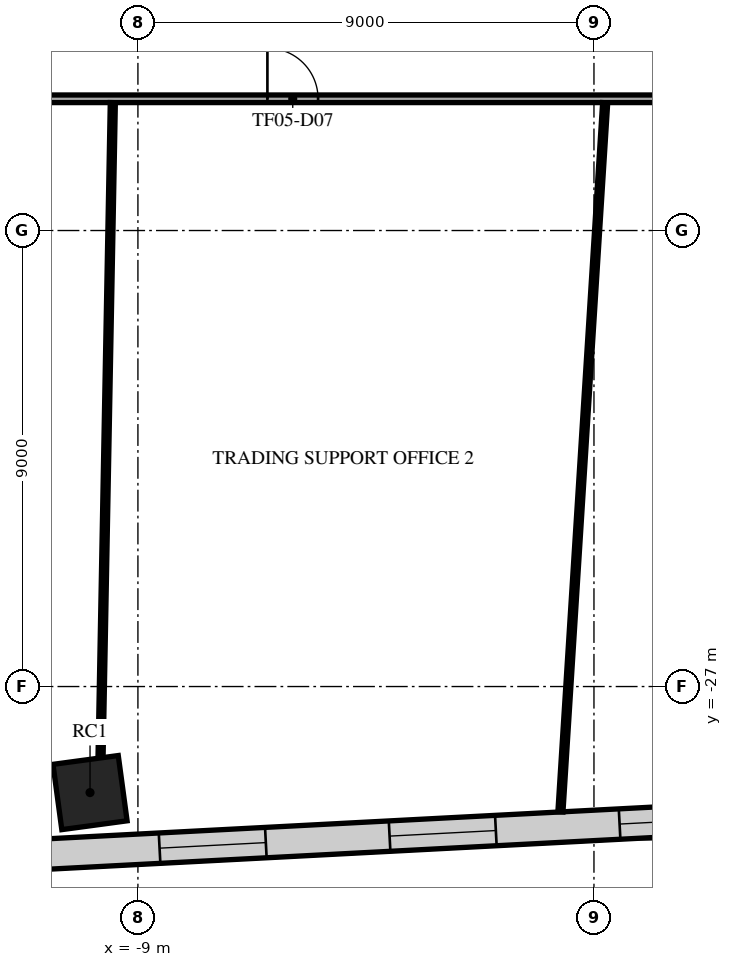
"""IFC4 building model, lengths in metres.
Left out: names, types, materials, properties, quantities, classifications, styles, units other than length and angle.
Written with IfcOpenShell. Run it as: python <this file> out.ifc"""

import sys

from ifc_helpers import new_model, si_unit, direction, frame, frame_2d, origin, origin_2d, place, context, subcontext, project, spatial, rectangle, extrude, element, fill, save


model = new_model("IFC4")
c1 = context("Model", 3, precision=1e-05, world=origin(), true_north=direction((0.0, 1.0)))
c2 = subcontext(c1, "Body", "Model", "MODEL_VIEW")
j1 = project(units=[si_unit("LENGTHUNIT", "METRE"), si_unit("PLANEANGLEUNIT", "RADIAN")], contexts=[c1])
p1 = place(None, origin())
s1 = spatial("IfcSite", under=j1, at=p1, CompositionType="ELEMENT")
p2 = place(p1, origin())
s2 = spatial("IfcBuilding", under=s1, at=p2, CompositionType="ELEMENT")
p3 = place(p2, frame((0.0, 0.0, 22.5)))
s3 = spatial("IfcBuildingStorey", under=s2, at=p3, CompositionType="ELEMENT", Elevation=22.5)
p4 = place(p3, frame((-9.945, -29.093, 0.0), z_axis=(0.0, 0.0, 1.0), x_axis=(0.991001197216, 0.133853005627, 0.0)))
e1 = element("IfcColumn", 1, at=p4, inside=s3, PredefinedType="COLUMN", context=c2, shape_type="SweptSolid", body=[
    extrude(rectangle(XDim=1.3, YDim=1.3, at=origin_2d()), origin(), (0.0, 0.0, 1.0), 4.8),
])
p5 = place(p3, frame((-23.287, -30.961, 0.0), z_axis=(0.0, 0.0, 1.0), x_axis=(0.998629570739, 0.052335269612, 0.0)))
e2 = element("IfcWall", 2, at=p5, inside=s3, PredefinedType="STANDARD", context=c2, shape_type="SweptSolid", body=[
    extrude(rectangle(XDim=49.751, YDim=0.6, at=frame_2d((24.876, 0.0))), origin(), (0.0, 0.0, 1.0), 4.35),
])
p6 = place(p5, frame((1.161, 0.0, 0.9)))
e3 = element("IfcOpeningElement", 3, at=p6, cuts=e2, PredefinedType="OPENING", context=c2, shape_type="SweptSolid", body=[
    extrude(rectangle(XDim=2.1, YDim=2.7, at=frame_2d((1.05, 1.35))), frame((0.0, 0.31, 0.0), z_axis=(0.0, -1.0, 0.0), x_axis=(1.0, 0.0, 0.0)), (0.0, 0.0, 1.0), 0.62),
])
p7 = place(p5, frame((5.644, 0.0, 0.9)))
e4 = element("IfcOpeningElement", 4, at=p7, cuts=e2, PredefinedType="OPENING", context=c2, shape_type="SweptSolid", body=[
    extrude(rectangle(XDim=2.1, YDim=2.7, at=frame_2d((1.05, 1.35))), frame((0.0, 0.31, 0.0), z_axis=(0.0, -1.0, 0.0), x_axis=(1.0, 0.0, 0.0)), (0.0, 0.0, 1.0), 0.62),
])
p8 = place(p5, frame((10.189, 0.0, 0.9)))
e5 = element("IfcOpeningElement", 5, at=p8, cuts=e2, PredefinedType="OPENING", context=c2, shape_type="SweptSolid", body=[
    extrude(rectangle(XDim=2.1, YDim=2.7, at=frame_2d((1.05, 1.35))), frame((0.0, 0.31, 0.0), z_axis=(0.0, -1.0, 0.0), x_axis=(1.0, 0.0, 0.0)), (0.0, 0.0, 1.0), 0.62),
])
p9 = place(p5, frame((14.735, 0.0, 0.9)))
e6 = element("IfcOpeningElement", 6, at=p9, cuts=e2, PredefinedType="OPENING", context=c2, shape_type="SweptSolid", body=[
    extrude(rectangle(XDim=2.1, YDim=2.7, at=frame_2d((1.05, 1.35))), frame((0.0, 0.31, 0.0), z_axis=(0.0, -1.0, 0.0), x_axis=(1.0, 0.0, 0.0)), (0.0, 0.0, 1.0), 0.62),
])
p10 = place(p5, frame((19.28, 0.0, 0.9)))
e7 = element("IfcOpeningElement", 7, at=p10, cuts=e2, PredefinedType="OPENING", context=c2, shape_type="SweptSolid", body=[
    extrude(rectangle(XDim=2.1, YDim=2.7, at=frame_2d((1.05, 1.35))), frame((0.0, 0.31, 0.0), z_axis=(0.0, -1.0, 0.0), x_axis=(1.0, 0.0, 0.0)), (0.0, 0.0, 1.0), 0.62),
])
p11 = place(p5, frame((23.826, 0.0, 0.9)))
e8 = element("IfcOpeningElement", 8, at=p11, cuts=e2, PredefinedType="OPENING", context=c2, shape_type="SweptSolid", body=[
    extrude(rectangle(XDim=2.1, YDim=2.7, at=frame_2d((1.05, 1.35))), frame((0.0, 0.31, 0.0), z_axis=(0.0, -1.0, 0.0), x_axis=(1.0, 0.0, 0.0)), (0.0, 0.0, 1.0), 0.62),
])
p12 = place(p5, frame((28.371, 0.0, 0.9)))
e9 = element("IfcOpeningElement", 9, at=p12, cuts=e2, PredefinedType="OPENING", context=c2, shape_type="SweptSolid", body=[
    extrude(rectangle(XDim=2.1, YDim=2.7, at=frame_2d((1.05, 1.35))), frame((0.0, 0.31, 0.0), z_axis=(0.0, -1.0, 0.0), x_axis=(1.0, 0.0, 0.0)), (0.0, 0.0, 1.0), 0.62),
])
p13 = place(p5, frame((32.917, 0.0, 0.9)))
e10 = element("IfcOpeningElement", 10, at=p13, cuts=e2, PredefinedType="OPENING", context=c2, shape_type="SweptSolid", body=[
    extrude(rectangle(XDim=2.1, YDim=2.7, at=frame_2d((1.05, 1.35))), frame((0.0, 0.31, 0.0), z_axis=(0.0, -1.0, 0.0), x_axis=(1.0, 0.0, 0.0)), (0.0, 0.0, 1.0), 0.62),
])
p14 = place(p5, frame((37.462, 0.0, 0.9)))
e11 = element("IfcOpeningElement", 11, at=p14, cuts=e2, PredefinedType="OPENING", context=c2, shape_type="SweptSolid", body=[
    extrude(rectangle(XDim=2.1, YDim=2.7, at=frame_2d((1.05, 1.35))), frame((0.0, 0.31, 0.0), z_axis=(0.0, -1.0, 0.0), x_axis=(1.0, 0.0, 0.0)), (0.0, 0.0, 1.0), 0.62),
])
p15 = place(p5, frame((42.008, 0.0, 0.9)))
e12 = element("IfcOpeningElement", 12, at=p15, cuts=e2, PredefinedType="OPENING", context=c2, shape_type="SweptSolid", body=[
    extrude(rectangle(XDim=2.1, YDim=2.7, at=frame_2d((1.05, 1.35))), frame((0.0, 0.31, 0.0), z_axis=(0.0, -1.0, 0.0), x_axis=(1.0, 0.0, 0.0)), (0.0, 0.0, 1.0), 0.62),
])
p16 = place(p5, frame((46.491, 0.0, 0.9)))
e13 = element("IfcOpeningElement", 13, at=p16, cuts=e2, PredefinedType="OPENING", context=c2, shape_type="SweptSolid", body=[
    extrude(rectangle(XDim=2.1, YDim=2.7, at=frame_2d((1.05, 1.35))), frame((0.0, 0.31, 0.0), z_axis=(0.0, -1.0, 0.0), x_axis=(1.0, 0.0, 0.0)), (0.0, 0.0, 1.0), 0.62),
])
p17 = place(p3, frame((-15.325, -15.4, 0.0), z_axis=(0.0, 0.0, 1.0), x_axis=(1.0, 0.0, 0.0)))
e14 = element("IfcWall", 14, at=p17, inside=s3, PredefinedType="PARTITIONING", context=c2, shape_type="SweptSolid", body=[
    extrude(rectangle(XDim=30.725, YDim=0.15, at=frame_2d((15.362, 0.0))), origin(), (0.0, 0.0, 1.0), 3.85),
])
p18 = place(p17, frame((8.88, 0.0, 0.0)))
e15 = element("IfcOpeningElement", 15, at=p18, cuts=e14, PredefinedType="OPENING", context=c2, shape_type="SweptSolid", body=[
    extrude(rectangle(XDim=1.0, YDim=2.1, at=frame_2d((0.5, 1.05))), frame((0.0, 0.085, 0.0), z_axis=(0.0, -1.0, 0.0), x_axis=(1.0, 0.0, 0.0)), (0.0, 0.0, 1.0), 0.17),
])
p19 = place(p17, frame((27.348, 0.0, 0.0)))
e16 = element("IfcOpeningElement", 16, at=p19, cuts=e14, PredefinedType="OPENING", context=c2, shape_type="SweptSolid", body=[
    extrude(rectangle(XDim=1.8, YDim=2.1, at=frame_2d((0.9, 1.05))), frame((0.0, 0.085, 0.0), z_axis=(0.0, -1.0, 0.0), x_axis=(1.0, 0.0, 0.0)), (0.0, 0.0, 1.0), 0.17),
])
p20 = place(p17, frame((19.348, 0.0, 0.0)))
e17 = element("IfcOpeningElement", 17, at=p20, cuts=e14, PredefinedType="OPENING", context=c2, shape_type="SweptSolid", body=[
    extrude(rectangle(XDim=1.0, YDim=2.1, at=frame_2d((0.5, 1.05))), frame((0.0, 0.085, 0.0), z_axis=(0.0, -1.0, 0.0), x_axis=(1.0, 0.0, 0.0)), (0.0, 0.0, 1.0), 0.17),
])
p21 = place(p3, frame((-9.738, -28.409, 0.0), z_axis=(0.0, 0.0, 1.0), x_axis=(0.01874139866, 0.999824364564, 0.0)))
e18 = element("IfcWall", 18, at=p21, inside=s3, PredefinedType="PARTITIONING", context=c2, shape_type="SweptSolid", body=[
    extrude(rectangle(XDim=12.936, YDim=0.1, at=frame_2d((6.468, 0.0))), origin(), (0.0, 0.0, 1.0), 3.85),
])
p22 = place(p3, frame((-0.662, -29.473, 0.0), z_axis=(0.0, 0.0, 1.0), x_axis=(0.06297334424, 0.99801520926, 0.0)))
e19 = element("IfcWall", 19, at=p22, inside=s3, PredefinedType="PARTITIONING", context=c2, shape_type="SweptSolid", body=[
    extrude(rectangle(XDim=14.023, YDim=0.1, at=frame_2d((7.011, 0.0))), origin(), (0.0, 0.0, 1.0), 3.55),
])
p23 = place(p9, origin())
e20 = element("IfcWindow", 20, at=p23, inside=s3, PartitioningType="SINGLE_PANEL", PredefinedType="WINDOW", context=c2, shape_type="SweptSolid", body=[
    extrude(rectangle(XDim=2.1, YDim=2.7, at=frame_2d((1.05, 1.35))), frame((0.0, 0.03, 0.0), z_axis=(0.0, -1.0, 0.0), x_axis=(1.0, 0.0, 0.0)), (0.0, 0.0, 1.0), 0.06),
])
fill(e6, e20)
p24 = place(p10, origin())
e21 = element("IfcWindow", 21, at=p24, inside=s3, PartitioningType="SINGLE_PANEL", PredefinedType="WINDOW", context=c2, shape_type="SweptSolid", body=[
    extrude(rectangle(XDim=2.1, YDim=2.7, at=frame_2d((1.05, 1.35))), frame((0.0, 0.03, 0.0), z_axis=(0.0, -1.0, 0.0), x_axis=(1.0, 0.0, 0.0)), (0.0, 0.0, 1.0), 0.06),
])
fill(e7, e21)
p25 = place(p11, origin())
e22 = element("IfcWindow", 22, at=p25, inside=s3, PartitioningType="SINGLE_PANEL", PredefinedType="WINDOW", context=c2, shape_type="SweptSolid", body=[
    extrude(rectangle(XDim=2.1, YDim=2.7, at=frame_2d((1.05, 1.35))), frame((0.0, 0.03, 0.0), z_axis=(0.0, -1.0, 0.0), x_axis=(1.0, 0.0, 0.0)), (0.0, 0.0, 1.0), 0.06),
])
fill(e8, e22)
p26 = place(p18, frame((1.0, 0.0, 0.0), z_axis=(0.0, 0.0, 1.0), x_axis=(-1.0, 0.0, 0.0)))
e23 = element("IfcDoor", 23, at=p26, inside=s3, OperationType="SINGLE_SWING_LEFT", PredefinedType="DOOR", context=c2, shape_type="SweptSolid", body=[
    extrude(rectangle(XDim=1.0, YDim=2.1, at=frame_2d((0.5, 1.05))), frame((0.0, 0.025, 0.0), z_axis=(0.0, -1.0, 0.0), x_axis=(1.0, 0.0, 0.0)), (0.0, 0.0, 1.0), 0.05),
])
fill(e15, e23)
save(model, sys.argv[1])
